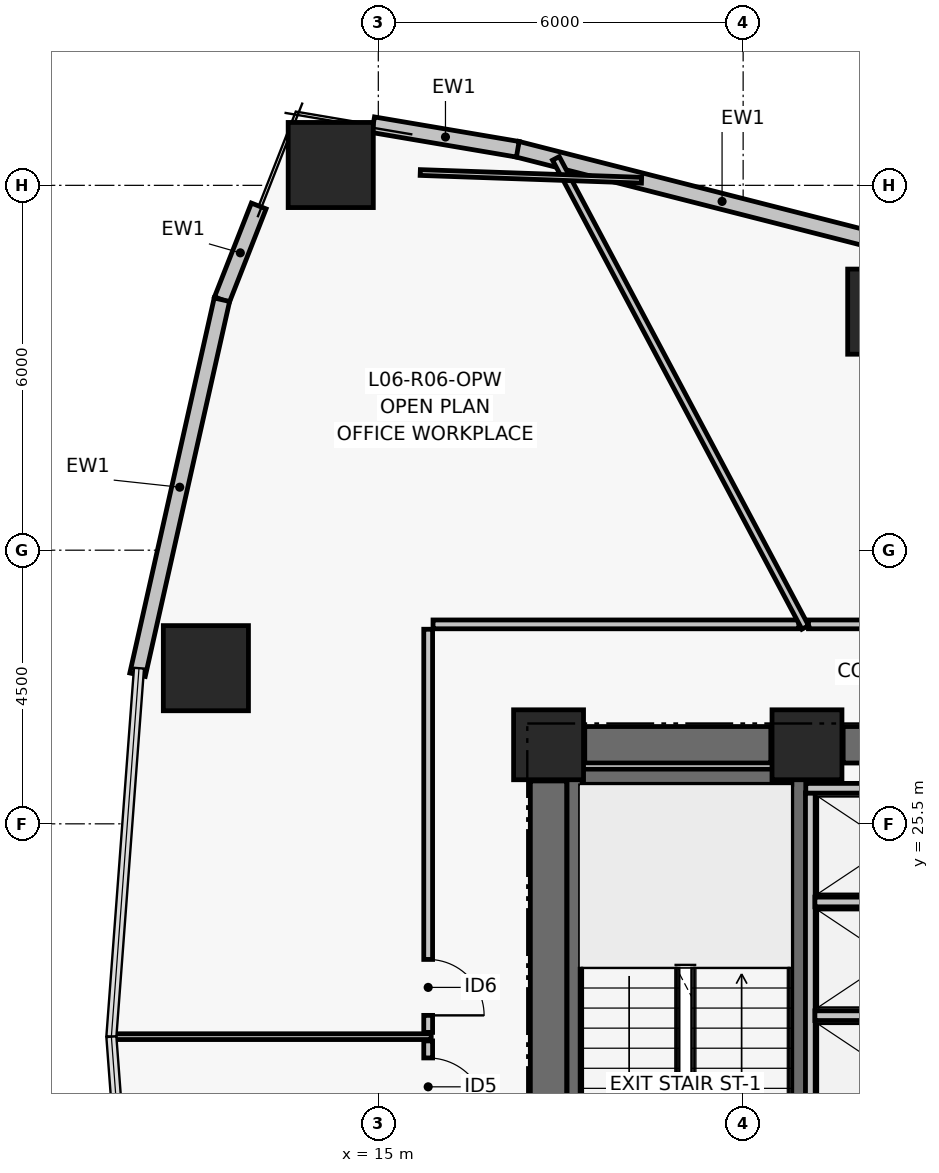
"""IFC4 building model, lengths in metres.
Left out: names, types, materials, properties, quantities, classifications, styles, units other than length and angle.
Written with IfcOpenShell. Run it as: python <this file> out.ifc"""

import sys

from ifc_helpers import new_model, si_unit, direction, frame, frame_2d, origin, origin_2d, place, context, subcontext, project, spatial, rectangle, hollow_rectangle, extrude, element, fill, save


model = new_model("IFC4")
c1 = context("Model", 3, precision=1e-05, world=origin(), true_north=direction((0.0, 1.0)))
c2 = subcontext(c1, "Body", "Model", "MODEL_VIEW")
j1 = project(units=[si_unit("LENGTHUNIT", "METRE"), si_unit("PLANEANGLEUNIT", "RADIAN")], contexts=[c1])
p1 = place(None, origin())
s1 = spatial("IfcSite", under=j1, at=p1, CompositionType="ELEMENT")
p2 = place(p1, origin())
s2 = spatial("IfcBuilding", under=s1, at=p2, CompositionType="ELEMENT")
p3 = place(p2, frame((0.0, 0.0, 31.32)))
s3 = spatial("IfcBuildingStorey", under=s2, at=p3, CompositionType="ELEMENT", Elevation=31.32)
for number, where, z_axis, x_axis in (
    (1, (17.8, 26.8, 0.0), (0.0, 0.0, 1.0), (1.0, 0.0, 0.0)),
    (2, (22.05, 26.8, 0.0), (0.0, 0.0, 1.0), (1.0, 0.0, 0.0)),
):
    element("IfcColumn", number, at=place(p3, frame(where, z_axis=z_axis, x_axis=x_axis)), inside=s3, PredefinedType="COLUMN", context=c2, shape_type="SweptSolid", body=[
        extrude(rectangle(XDim=1.15, YDim=1.15, at=origin_2d()), origin(), (0.0, 0.0, 1.0), 3.72),
    ])
p4 = place(p3, frame((18.395, 26.8, 0.0), z_axis=(0.0, 0.0, 1.0), x_axis=(1.0, 0.0, 0.0)))
e3 = element("IfcWall", 3, at=p4, inside=s3, PredefinedType="SHEAR", context=c2, shape_type="SweptSolid", body=[
    extrude(rectangle(XDim=3.06, YDim=0.6, at=frame_2d((1.53, 0.0))), origin(), (0.0, 0.0, 1.0), 3.47),
])
p5 = place(p3, frame((22.645, 26.8, 0.0), z_axis=(0.0, 0.0, 1.0), x_axis=(1.0, 0.0, 0.0)))
e4 = element("IfcWall", 4, at=p5, inside=s3, PredefinedType="SHEAR", context=c2, shape_type="SweptSolid", body=[
    extrude(rectangle(XDim=1.705, YDim=0.6, at=frame_2d((0.853, 0.0))), origin(), (0.0, 0.0, 1.0), 3.47),
])
p6 = place(p3, frame((17.8, 17.795, 0.0), z_axis=(0.0, 0.0, 1.0), x_axis=(0.0, 1.0, 0.0)))
e5 = element("IfcWall", 5, at=p6, inside=s3, PredefinedType="SHEAR", context=c2, shape_type="SweptSolid", body=[
    extrude(rectangle(XDim=8.41, YDim=0.6, at=frame_2d((4.205, 0.0))), origin(), (0.0, 0.0, 1.0), 3.47),
])
p7 = place(p3, frame((18.229, 17.6, 0.0), z_axis=(0.0, 0.0, 1.0), x_axis=(0.0, 1.0, 0.0)))
e6 = element("IfcWall", 6, at=p7, inside=s3, PredefinedType="SHEAR", context=c2, shape_type="SweptSolid", body=[
    extrude(rectangle(XDim=8.8, YDim=0.25, at=frame_2d((4.4, 0.0))), origin(), (0.0, 0.0, 1.0), 3.47),
])
p8 = place(p3, frame((21.925, 17.6, 0.0), z_axis=(0.0, 0.0, 1.0), x_axis=(0.0, 1.0, 0.0)))
e7 = element("IfcWall", 7, at=p8, inside=s3, PredefinedType="SHEAR", context=c2, shape_type="SweptSolid", body=[
    extrude(rectangle(XDim=8.8, YDim=0.25, at=frame_2d((4.4, 0.0))), origin(), (0.0, 0.0, 1.0), 3.47),
])
p9 = place(p8, frame((0.35, 0.0, 0.0)))
e8 = element("IfcOpeningElement", 8, at=p9, cuts=e7, PredefinedType="OPENING", context=c2, shape_type="SweptSolid", body=[
    extrude(rectangle(XDim=1.05, YDim=2.08, at=frame_2d((0.525, 1.04))), frame((0.0, 0.135, 0.0), z_axis=(0.0, -1.0, 0.0), x_axis=(1.0, 0.0, 0.0)), (0.0, 0.0, 1.0), 0.27),
])
p10 = place(p3, frame((18.354, 26.275, 0.0), z_axis=(0.0, 0.0, 1.0), x_axis=(1.0, 0.0, 0.0)))
e9 = element("IfcWall", 9, at=p10, inside=s3, PredefinedType="SHEAR", context=c2, shape_type="SweptSolid", body=[
    extrude(rectangle(XDim=3.446, YDim=0.25, at=frame_2d((1.723, 0.0))), origin(), (0.0, 0.0, 1.0), 3.47),
])
for number, where, z_axis, x_axis in (
    (10, (23.419, 33.923, 0.0), (0.0, 0.0, 1.0), (1.0, 0.0, 0.0)),
    (11, (14.218, 36.334, 0.0), (0.0, 0.0, 1.0), (1.0, 0.0, 0.0)),
    (12, (12.164, 28.06, 0.0), (0.0, 0.0, 1.0), (1.0, 0.0, 0.0)),
):
    element("IfcColumn", number, at=place(p3, frame(where, z_axis=z_axis, x_axis=x_axis)), inside=s3, PredefinedType="COLUMN", context=c2, shape_type="SweptSolid", body=[
        extrude(hollow_rectangle(XDim=1.4, YDim=1.4, WallThickness=0.055, at=origin_2d()), origin(), (0.0, 0.0, 1.0), 3.72),
    ])
p11 = place(p3, frame((17.282, 36.596, 0.0), z_axis=(0.0, 0.0, 1.0), x_axis=(0.968977974408, -0.247147092057, 0.0)))
e13 = element("IfcWall", 13, at=p11, inside=s3, PredefinedType="PARTITIONING", context=c2, shape_type="SweptSolid", body=[
    extrude(rectangle(XDim=6.959, YDim=0.26, at=frame_2d((3.479, 0.0))), origin(), (0.0, 0.0, 1.0), 3.47),
])
p12 = place(p3, frame((14.915, 36.997, 0.0), z_axis=(0.0, 0.0, 1.0), x_axis=(0.985905469923, -0.167303330437, 0.0)))
e14 = element("IfcWall", 14, at=p12, inside=s3, PredefinedType="PARTITIONING", context=c2, shape_type="SweptSolid", body=[
    extrude(rectangle(XDim=2.412, YDim=0.26, at=frame_2d((1.206, 0.0))), origin(), (0.0, 0.0, 1.0), 3.47),
])
p13 = place(p3, frame((12.427, 34.119, 0.0), z_axis=(0.0, 0.0, 1.0), x_axis=(0.365666052462, 0.930746119023, 0.0)))
e15 = element("IfcWall", 15, at=p13, inside=s3, PredefinedType="PARTITIONING", context=c2, shape_type="SweptSolid", body=[
    extrude(rectangle(XDim=1.656, YDim=0.26, at=frame_2d((0.828, 0.0))), origin(), (0.0, 0.0, 1.0), 3.47),
])
p14 = place(p3, frame((11.04, 27.952, 0.0), z_axis=(0.0, 0.0, 1.0), x_axis=(0.219502085231, 0.975612030768, 0.0)))
e16 = element("IfcWall", 16, at=p14, inside=s3, PredefinedType="PARTITIONING", context=c2, shape_type="SweptSolid", body=[
    extrude(rectangle(XDim=6.321, YDim=0.26, at=frame_2d((3.16, 0.0))), origin(), (0.0, 0.0, 1.0), 3.47),
])
p15 = place(p3, frame((22.105, 20.56, 0.0), z_axis=(0.0, 0.0, 1.0), x_axis=(0.0, 1.0, 0.0)))
e17 = element("IfcWall", 17, at=p15, inside=s3, PredefinedType="PARTITIONING", context=c2, shape_type="SweptSolid", body=[
    extrude(rectangle(XDim=5.45, YDim=0.16, at=frame_2d((2.725, 0.0))), origin(), (0.0, 0.0, 1.0), 3.47),
])
p16 = place(p3, frame((22.18, 22.345, 0.0), z_axis=(0.0, 0.0, 1.0), x_axis=(1.0, 0.0, 0.0)))
e18 = element("IfcWall", 18, at=p16, inside=s3, PredefinedType="PARTITIONING", context=c2, shape_type="SweptSolid", body=[
    extrude(rectangle(XDim=2.65, YDim=0.16, at=frame_2d((1.325, 0.0))), origin(), (0.0, 0.0, 1.0), 3.47),
])
p17 = place(p3, frame((22.18, 24.215, 0.0), z_axis=(0.0, 0.0, 1.0), x_axis=(1.0, 0.0, 0.0)))
e19 = element("IfcWall", 19, at=p17, inside=s3, PredefinedType="PARTITIONING", context=c2, shape_type="SweptSolid", body=[
    extrude(rectangle(XDim=2.49, YDim=0.16, at=frame_2d((1.245, 0.0))), origin(), (0.0, 0.0, 1.0), 3.47),
])
p18 = place(p3, frame((22.03, 26.085, 0.0), z_axis=(0.0, 0.0, 1.0), x_axis=(1.0, 0.0, 0.0)))
e20 = element("IfcWall", 20, at=p18, inside=s3, PredefinedType="PARTITIONING", context=c2, shape_type="SweptSolid", body=[
    extrude(rectangle(XDim=2.83, YDim=0.16, at=frame_2d((1.415, 0.0))), origin(), (0.0, 0.0, 1.0), 3.47),
])
p19 = place(p3, frame((15.82, 21.93, 0.0), z_axis=(0.0, 0.0, 1.0), x_axis=(0.0, -1.0, 0.0)))
e21 = element("IfcWall", 21, at=p19, inside=s3, PredefinedType="PARTITIONING", context=c2, shape_type="SweptSolid", body=[
    extrude(rectangle(XDim=8.64, YDim=0.145, at=frame_2d((4.32, 0.0))), origin(), (0.0, 0.0, 1.0), 2.6),
])
p20 = place(p19, frame((0.28, 0.0, 0.0)))
e22 = element("IfcOpeningElement", 22, at=p20, cuts=e21, PredefinedType="OPENING", context=c2, shape_type="SweptSolid", body=[
    extrude(rectangle(XDim=0.95, YDim=2.06, at=frame_2d((0.475, 1.03))), frame((0.0, 0.083, 0.0), z_axis=(0.0, -1.0, 0.0), x_axis=(1.0, 0.0, 0.0)), (0.0, 0.0, 1.0), 0.165),
])
p21 = place(p3, frame((29.754, 28.78, 0.0), z_axis=(0.0, 0.0, 1.0), x_axis=(-1.0, 0.0, 0.0)))
e23 = element("IfcWall", 23, at=p21, inside=s3, PredefinedType="PARTITIONING", context=c2, shape_type="SweptSolid", body=[
    extrude(rectangle(XDim=7.68, YDim=0.145, at=frame_2d((3.84, 0.0))), origin(), (0.0, 0.0, 1.0), 2.6),
])
p22 = place(p21, frame((3.365, 0.0, 0.0)))
e24 = element("IfcOpeningElement", 24, at=p22, cuts=e23, PredefinedType="OPENING", context=c2, shape_type="SweptSolid", body=[
    extrude(rectangle(XDim=0.95, YDim=2.06, at=frame_2d((0.475, 1.03))), frame((0.0, 0.083, 0.0), z_axis=(0.0, -1.0, 0.0), x_axis=(1.0, 0.0, 0.0)), (0.0, 0.0, 1.0), 0.165),
])
p23 = place(p3, frame((21.916, 28.78, 0.0), z_axis=(0.0, 0.0, 1.0), x_axis=(-1.0, 0.0, 0.0)))
e25 = element("IfcWall", 25, at=p23, inside=s3, PredefinedType="PARTITIONING", context=c2, shape_type="SweptSolid", body=[
    extrude(rectangle(XDim=6.016, YDim=0.145, at=frame_2d((3.008, 0.0))), origin(), (0.0, 0.0, 1.0), 2.6),
])
p24 = place(p3, frame((15.82, 28.7, 0.0), z_axis=(0.0, 0.0, 1.0), x_axis=(0.0, -1.0, 0.0)))
e26 = element("IfcWall", 26, at=p24, inside=s3, PredefinedType="PARTITIONING", context=c2, shape_type="SweptSolid", body=[
    extrude(rectangle(XDim=6.63, YDim=0.145, at=frame_2d((3.315, 0.0))), origin(), (0.0, 0.0, 1.0), 2.6),
])
p25 = place(p24, frame((5.43, 0.0, 0.0)))
e27 = element("IfcOpeningElement", 27, at=p25, cuts=e26, PredefinedType="OPENING", context=c2, shape_type="SweptSolid", body=[
    extrude(rectangle(XDim=0.92, YDim=2.05, at=frame_2d((0.46, 1.025))), frame((0.0, 0.083, 0.0), z_axis=(0.0, -1.0, 0.0), x_axis=(1.0, 0.0, 0.0)), (0.0, 0.0, 1.0), 0.165),
])
p26 = place(p3, frame((22.021, 28.73, 0.0), z_axis=(0.0, 0.0, 1.0), x_axis=(-0.469465111929, 0.88295102281, 0.0)))
e28 = element("IfcWall", 28, at=p26, inside=s3, PredefinedType="PARTITIONING", context=c2, shape_type="SweptSolid", body=[
    extrude(rectangle(XDim=8.736, YDim=0.125, at=frame_2d((4.368, 0.0))), origin(), (0.0, 0.0, 1.0), 2.85),
])
p27 = place(p3, frame((15.87, 22.0, 0.0), z_axis=(0.0, 0.0, 1.0), x_axis=(-1.0, 0.0, 0.0)))
e29 = element("IfcWall", 29, at=p27, inside=s3, PredefinedType="PARTITIONING", context=c2, shape_type="SweptSolid", body=[
    extrude(rectangle(XDim=5.271, YDim=0.095, at=frame_2d((2.635, 0.0))), origin(), (0.0, 0.0, 1.0), 2.85),
])
p28 = place(p3, frame((19.329, 36.084, 0.0), z_axis=(0.0, 0.0, 1.0), x_axis=(-0.999389725088, 0.03493103762, 0.0)))
e30 = element("IfcWall", 30, at=p28, inside=s3, PredefinedType="PARTITIONING", context=c2, shape_type="SweptSolid", body=[
    extrude(rectangle(XDim=3.641, YDim=0.095, at=frame_2d((1.821, 0.0))), origin(), (0.0, 0.0, 1.0), 3.47),
])
p29 = place(p20, origin())
e31 = element("IfcDoor", 31, at=p29, inside=s3, OperationType="SINGLE_SWING_RIGHT", PredefinedType="DOOR", context=c2, shape_type="SweptSolid", body=[
    extrude(rectangle(XDim=0.95, YDim=2.06, at=frame_2d((0.475, 1.03))), frame((0.0, 0.025, 0.0), z_axis=(0.0, -1.0, 0.0), x_axis=(1.0, 0.0, 0.0)), (0.0, 0.0, 1.0), 0.05),
])
fill(e22, e31)
p30 = place(p25, origin())
e32 = element("IfcDoor", 32, at=p30, inside=s3, OperationType="SINGLE_SWING_RIGHT", PredefinedType="DOOR", context=c2, shape_type="SweptSolid", body=[
    extrude(rectangle(XDim=0.92, YDim=2.05, at=frame_2d((0.46, 1.025))), frame((0.0, 0.025, 0.0), z_axis=(0.0, -1.0, 0.0), x_axis=(1.0, 0.0, 0.0)), (0.0, 0.0, 1.0), 0.05),
])
fill(e27, e32)
save(model, sys.argv[1])
